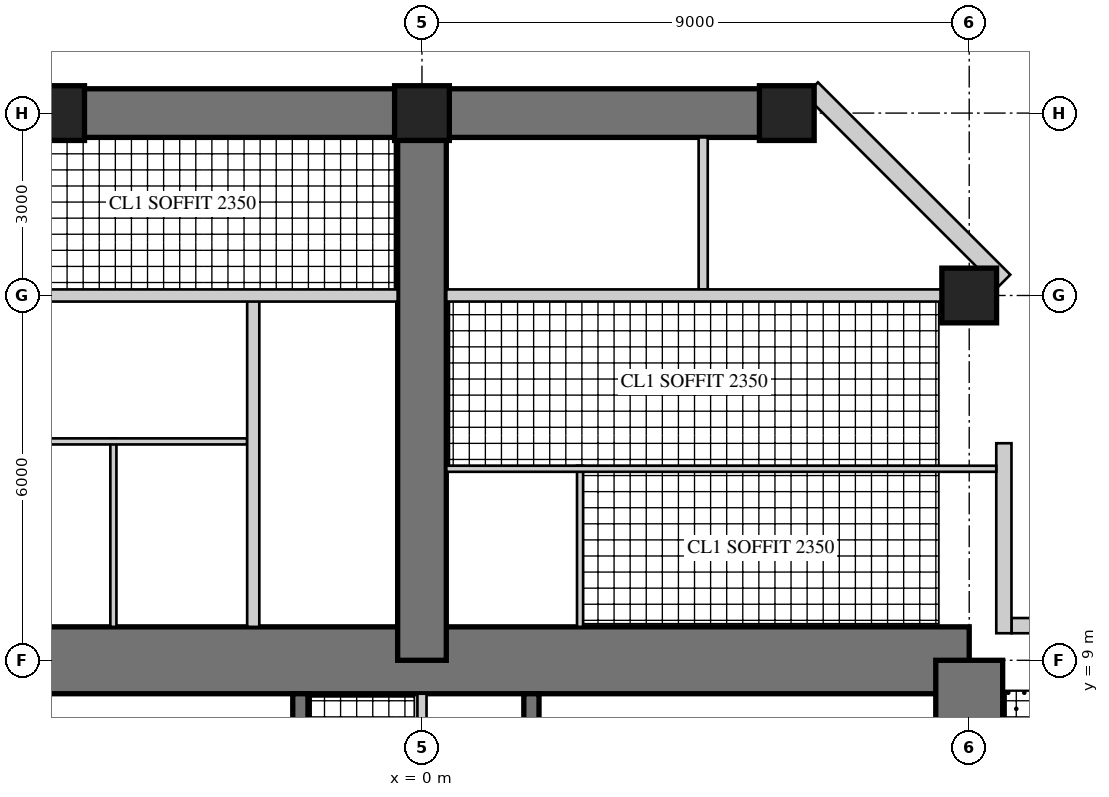
"""IFC4 building model, lengths in metres.
Left out: names, types, materials, properties, quantities, classifications, styles, units other than length and angle.
Written with IfcOpenShell. Run it as: python <this file> out.ifc"""

import sys

from ifc_helpers import new_model, si_unit, direction, frame, frame_2d, origin, origin_2d, place, context, subcontext, project, spatial, rectangle, hollow_rectangle, extrude, element, fill, save


model = new_model("IFC4")
c1 = context("Model", 3, precision=1e-05, world=origin(), true_north=direction((0.0, 1.0)))
c2 = subcontext(c1, "Body", "Model", "MODEL_VIEW")
j1 = project(units=[si_unit("LENGTHUNIT", "METRE"), si_unit("PLANEANGLEUNIT", "RADIAN")], contexts=[c1])
p1 = place(None, origin())
s1 = spatial("IfcSite", under=j1, at=p1, CompositionType="ELEMENT")
p2 = place(p1, origin())
s2 = spatial("IfcBuilding", under=s1, at=p2, CompositionType="ELEMENT")
p3 = place(p2, frame((0.0, 0.0, 206.9)))
s3 = spatial("IfcBuildingStorey", under=s2, at=p3, CompositionType="ELEMENT", Elevation=206.9)
p4 = place(p3, frame((9.0, 9.0, 0.0), z_axis=(0.0, 0.0, 1.0), x_axis=(-1.0, 0.0, 0.0)))
e1 = element("IfcWall", 1, at=p4, inside=s3, PredefinedType="SHEAR", context=c2, shape_type="SweptSolid", body=[
    extrude(rectangle(XDim=18.0, YDim=1.1, at=frame_2d((9.0, 0.0))), origin(), (0.0, 0.0, 1.0), 3.4),
])
p5 = place(p4, frame((9.8, 0.0, 0.0)))
e2 = element("IfcOpeningElement", 2, at=p5, cuts=e1, PredefinedType="OPENING", context=c2, shape_type="SweptSolid", body=[
    extrude(rectangle(XDim=1.0, YDim=2.4, at=frame_2d((0.5, 1.2))), frame((0.0, 0.56, 0.0), z_axis=(0.0, -1.0, 0.0), x_axis=(1.0, 0.0, 0.0)), (0.0, 0.0, 1.0), 1.12),
])
p6 = place(p3, frame((9.0, -9.0, 0.0), z_axis=(0.0, 0.0, 1.0), x_axis=(0.0, 1.0, 0.0)))
e3 = element("IfcWall", 3, at=p6, inside=s3, PredefinedType="SHEAR", context=c2, shape_type="SweptSolid", body=[
    extrude(rectangle(XDim=18.0, YDim=1.1, at=frame_2d((9.0, 0.0))), origin(), (0.0, 0.0, 1.0), 3.4),
])
p7 = place(p6, frame((9.8, 0.0, 0.0)))
e4 = element("IfcOpeningElement", 4, at=p7, cuts=e3, PredefinedType="OPENING", context=c2, shape_type="SweptSolid", body=[
    extrude(rectangle(XDim=1.0, YDim=2.4, at=frame_2d((0.5, 1.2))), frame((0.0, 0.56, 0.0), z_axis=(0.0, -1.0, 0.0), x_axis=(1.0, 0.0, 0.0)), (0.0, 0.0, 1.0), 1.12),
])
p8 = place(p3, frame((1.8, 1.875, 0.0), z_axis=(0.0, 0.0, 1.0), x_axis=(0.0, 1.0, 0.0)))
e5 = element("IfcWall", 5, at=p8, inside=s3, PredefinedType="SHEAR", context=c2, shape_type="SweptSolid", body=[
    extrude(rectangle(XDim=6.575, YDim=0.25, at=frame_2d((3.288, 0.0))), origin(), (0.0, 0.0, 1.0), 3.4),
])
p9 = place(p8, frame((1.875, 0.0, 0.0)))
e6 = element("IfcOpeningElement", 6, at=p9, cuts=e5, PredefinedType="OPENING", context=c2, shape_type="SweptSolid", body=[
    extrude(rectangle(XDim=1.6, YDim=2.4, at=frame_2d((0.8, 1.2))), frame((0.0, 0.135, 0.0), z_axis=(0.0, -1.0, 0.0), x_axis=(1.0, 0.0, 0.0)), (0.0, 0.0, 1.0), 0.27),
])
p10 = place(p3, frame((-2.0, 1.675, 0.0), z_axis=(0.0, 0.0, 1.0), x_axis=(0.0, 1.0, 0.0)))
e7 = element("IfcWall", 7, at=p10, inside=s3, PredefinedType="SHEAR", context=c2, shape_type="SweptSolid", body=[
    extrude(rectangle(XDim=6.775, YDim=0.25, at=frame_2d((3.387, 0.0))), origin(), (0.0, 0.0, 1.0), 3.4),
])
p11 = place(p10, frame((0.725, 0.0, 0.0)))
e8 = element("IfcOpeningElement", 8, at=p11, cuts=e7, PredefinedType="OPENING", context=c2, shape_type="SweptSolid", body=[
    extrude(rectangle(XDim=1.0, YDim=2.1, at=frame_2d((0.5, 1.05))), frame((0.0, 0.135, 0.0), z_axis=(0.0, -1.0, 0.0), x_axis=(1.0, 0.0, 0.0)), (0.0, 0.0, 1.0), 0.27),
])
p12 = place(p3, frame((0.0, 9.0, 0.0), z_axis=(0.0, 0.0, 1.0), x_axis=(0.0, 1.0, 0.0)))
e9 = element("IfcWall", 9, at=p12, inside=s3, PredefinedType="SHEAR", context=c2, shape_type="SweptSolid", body=[
    extrude(rectangle(XDim=9.0, YDim=0.8, at=frame_2d((4.5, 0.0))), origin(), (0.0, 0.0, 1.0), 3.4),
])
p13 = place(p12, frame((3.95, 0.0, 0.0)))
e10 = element("IfcOpeningElement", 10, at=p13, cuts=e9, PredefinedType="OPENING", context=c2, shape_type="SweptSolid", body=[
    extrude(rectangle(XDim=1.0, YDim=2.15, at=frame_2d((0.5, 1.075))), frame((0.0, 0.41, 0.0), z_axis=(0.0, -1.0, 0.0), x_axis=(1.0, 0.0, 0.0)), (0.0, 0.0, 1.0), 0.82),
])
p14 = place(p12, frame((7.0, 0.0, 0.0)))
e11 = element("IfcOpeningElement", 11, at=p14, cuts=e9, PredefinedType="OPENING", context=c2, shape_type="SweptSolid", body=[
    extrude(rectangle(XDim=1.0, YDim=2.2, at=frame_2d((0.5, 1.1))), frame((0.0, 0.41, 0.0), z_axis=(0.0, -1.0, 0.0), x_axis=(1.0, 0.0, 0.0)), (0.0, 0.0, 1.0), 0.82),
])
p15 = place(p3, frame((6.0, 18.0, 0.0), z_axis=(0.0, 0.0, 1.0), x_axis=(-1.0, 0.0, 0.0)))
e12 = element("IfcWall", 12, at=p15, inside=s3, PredefinedType="SHEAR", context=c2, shape_type="SweptSolid", body=[
    extrude(rectangle(XDim=12.0, YDim=0.8, at=frame_2d((6.0, 0.0))), origin(), (0.0, 0.0, 1.0), 3.4),
])
p16 = place(p15, frame((1.625, 0.0, 0.6)))
e13 = element("IfcOpeningElement", 13, at=p16, cuts=e12, PredefinedType="OPENING", context=c2, shape_type="SweptSolid", body=[
    extrude(rectangle(XDim=3.0, YDim=2.4, at=frame_2d((1.5, 1.2))), frame((0.0, 0.41, 0.0), z_axis=(0.0, -1.0, 0.0), x_axis=(1.0, 0.0, 0.0)), (0.0, 0.0, 1.0), 0.82),
])
p17 = place(p15, frame((7.375, 0.0, 0.6)))
e14 = element("IfcOpeningElement", 14, at=p17, cuts=e12, PredefinedType="OPENING", context=c2, shape_type="SweptSolid", body=[
    extrude(rectangle(XDim=3.0, YDim=2.4, at=frame_2d((1.5, 1.2))), frame((0.0, 0.41, 0.0), z_axis=(0.0, -1.0, 0.0), x_axis=(1.0, 0.0, 0.0)), (0.0, 0.0, 1.0), 0.82),
])
for number, where, z_axis, x_axis in (
    (15, (9.0, 15.0, 0.0), (0.0, 0.0, 1.0), (1.0, 0.0, 0.0)),
    (16, (6.0, 18.0, 0.0), (0.0, 0.0, 1.0), (1.0, 0.0, 0.0)),
    (17, (0.0, 18.0, 0.0), (0.0, 0.0, 1.0), (1.0, 0.0, 0.0)),
    (18, (-6.0, 18.0, 0.0), (0.0, 0.0, 1.0), (1.0, 0.0, 0.0)),
):
    element("IfcColumn", number, at=place(p3, frame(where, z_axis=z_axis, x_axis=x_axis)), inside=s3, PredefinedType="COLUMN", context=c2, shape_type="SweptSolid", body=[
        extrude(rectangle(XDim=0.9, YDim=0.9, at=origin_2d()), origin(), (0.0, 0.0, 1.0), 3.4),
    ])
p18 = place(p3, frame((12.57, 9.57, 0.0), z_axis=(0.0, 0.0, 1.0), x_axis=(-1.0, 0.0, 0.0)))
e19 = element("IfcWall", 19, at=p18, inside=s3, PredefinedType="SOLIDWALL", context=c2, shape_type="SweptSolid", body=[
    extrude(rectangle(XDim=2.875, YDim=0.25, at=frame_2d((1.438, 0.0))), origin(), (0.0, 0.0, 1.0), 3.22),
])
p19 = place(p18, frame((0.6, 0.0, 0.0)))
e20 = element("IfcOpeningElement", 20, at=p19, cuts=e19, PredefinedType="OPENING", context=c2, shape_type="SweptSolid", body=[
    extrude(rectangle(XDim=1.0, YDim=2.2, at=frame_2d((0.5, 1.1))), frame((0.0, 0.135, 0.0), z_axis=(0.0, -1.0, 0.0), x_axis=(1.0, 0.0, 0.0)), (0.0, 0.0, 1.0), 0.27),
])
p20 = place(p3, frame((9.57, 9.445, 0.0), z_axis=(0.0, 0.0, 1.0), x_axis=(0.0, 1.0, 0.0)))
e21 = element("IfcWall", 21, at=p20, inside=s3, PredefinedType="SOLIDWALL", context=c2, shape_type="SweptSolid", body=[
    extrude(rectangle(XDim=3.125, YDim=0.25, at=frame_2d((1.562, 0.0))), origin(), (0.0, 0.0, 1.0), 3.22),
])
p21 = place(p20, frame((0.6, 0.0, 0.0)))
e22 = element("IfcOpeningElement", 22, at=p21, cuts=e21, PredefinedType="OPENING", context=c2, shape_type="SweptSolid", body=[
    extrude(rectangle(XDim=1.0, YDim=2.2, at=frame_2d((0.5, 1.1))), frame((0.0, 0.135, 0.0), z_axis=(0.0, -1.0, 0.0), x_axis=(1.0, 0.0, 0.0)), (0.0, 0.0, 1.0), 0.27),
])
p22 = place(p3, frame((9.57, 15.236, 0.0), z_axis=(0.0, 0.0, 1.0), x_axis=(-0.707134062067, 0.707079499254, 0.0)))
e23 = element("IfcWall", 23, at=p22, inside=s3, PredefinedType="SOLIDWALL", context=c2, shape_type="SweptSolid", body=[
    extrude(rectangle(XDim=4.475, YDim=0.3, at=frame_2d((2.237, 0.0))), origin(), (0.0, 0.0, 1.0), 3.22),
])
p23 = place(p22, frame((1.787, 0.0, 0.3)))
e24 = element("IfcOpeningElement", 24, at=p23, cuts=e23, PredefinedType="OPENING", context=c2, shape_type="SweptSolid", body=[
    extrude(rectangle(XDim=0.9, YDim=2.4, at=frame_2d((0.45, 1.2))), frame((0.0, 0.16, 0.0), z_axis=(0.0, -1.0, 0.0), x_axis=(1.0, 0.0, 0.0)), (0.0, 0.0, 1.0), 0.32),
])
p24 = place(p3, frame((0.0, 5.675, 0.0), z_axis=(0.0, 0.0, 1.0), x_axis=(0.0, 1.0, 0.0)))
e25 = element("IfcWall", 25, at=p24, inside=s3, PredefinedType="PARTITIONING", context=c2, shape_type="SweptSolid", body=[
    extrude(rectangle(XDim=2.775, YDim=0.15, at=frame_2d((1.387, 0.0))), origin(), (0.0, 0.0, 1.0), 3.22),
])
p25 = place(p24, frame((0.4, 0.0, 0.0)))
e26 = element("IfcOpeningElement", 26, at=p25, cuts=e25, PredefinedType="OPENING", context=c2, shape_type="SweptSolid", body=[
    extrude(rectangle(XDim=1.0, YDim=2.1, at=frame_2d((0.5, 1.05))), frame((0.0, 0.085, 0.0), z_axis=(0.0, -1.0, 0.0), x_axis=(1.0, 0.0, 0.0)), (0.0, 0.0, 1.0), 0.17),
])
p26 = place(p3, frame((-5.075, 9.55, 0.0), z_axis=(0.0, 0.0, 1.0), x_axis=(0.0, 1.0, 0.0)))
e27 = element("IfcWall", 27, at=p26, inside=s3, PredefinedType="PARTITIONING", context=c2, shape_type="SweptSolid", body=[
    extrude(rectangle(XDim=3.1, YDim=0.1, at=frame_2d((1.55, 0.0))), origin(), (0.0, 0.0, 1.0), 3.22),
])
p27 = place(p3, frame((-2.875, 12.6, 0.0), z_axis=(0.0, 0.0, 1.0), x_axis=(-1.0, 0.0, 0.0)))
e28 = element("IfcWall", 28, at=p27, inside=s3, PredefinedType="PARTITIONING", context=c2, shape_type="SweptSolid", body=[
    extrude(rectangle(XDim=6.57, YDim=0.1, at=frame_2d((3.285, 0.0))), origin(), (0.0, 0.0, 1.0), 3.22),
])
p28 = place(p27, frame((0.55, 0.0, 0.0)))
e29 = element("IfcOpeningElement", 29, at=p28, cuts=e28, PredefinedType="OPENING", context=c2, shape_type="SweptSolid", body=[
    extrude(rectangle(XDim=0.9, YDim=2.1, at=frame_2d((0.45, 1.05))), frame((0.0, 0.06, 0.0), z_axis=(0.0, -1.0, 0.0), x_axis=(1.0, 0.0, 0.0)), (0.0, 0.0, 1.0), 0.12),
])
p29 = place(p27, frame((2.65, 0.0, 0.0)))
e30 = element("IfcOpeningElement", 30, at=p29, cuts=e28, PredefinedType="OPENING", context=c2, shape_type="SweptSolid", body=[
    extrude(rectangle(XDim=0.9, YDim=2.1, at=frame_2d((0.45, 1.05))), frame((0.0, 0.06, 0.0), z_axis=(0.0, -1.0, 0.0), x_axis=(1.0, 0.0, 0.0)), (0.0, 0.0, 1.0), 0.12),
])
p30 = place(p3, frame((2.6, 9.55, 0.0), z_axis=(0.0, 0.0, 1.0), x_axis=(0.0, 1.0, 0.0)))
e31 = element("IfcWall", 31, at=p30, inside=s3, PredefinedType="PARTITIONING", context=c2, shape_type="SweptSolid", body=[
    extrude(rectangle(XDim=2.65, YDim=0.1, at=frame_2d((1.325, 0.0))), origin(), (0.0, 0.0, 1.0), 3.22),
])
p31 = place(p3, frame((9.445, 12.15, 0.0), z_axis=(0.0, 0.0, 1.0), x_axis=(-1.0, 0.0, 0.0)))
e32 = element("IfcWall", 32, at=p31, inside=s3, PredefinedType="PARTITIONING", context=c2, shape_type="SweptSolid", body=[
    extrude(rectangle(XDim=9.045, YDim=0.1, at=frame_2d((4.522, 0.0))), origin(), (0.0, 0.0, 1.0), 3.22),
])
p32 = place(p31, frame((5.495, 0.0, 0.0)))
e33 = element("IfcOpeningElement", 33, at=p32, cuts=e32, PredefinedType="OPENING", context=c2, shape_type="SweptSolid", body=[
    extrude(rectangle(XDim=0.9, YDim=2.1, at=frame_2d((0.45, 1.05))), frame((0.0, 0.06, 0.0), z_axis=(0.0, -1.0, 0.0), x_axis=(1.0, 0.0, 0.0)), (0.0, 0.0, 1.0), 0.12),
])
p33 = place(p31, frame((7.595, 0.0, 0.0)))
e34 = element("IfcOpeningElement", 34, at=p33, cuts=e32, PredefinedType="OPENING", context=c2, shape_type="SweptSolid", body=[
    extrude(rectangle(XDim=0.9, YDim=2.1, at=frame_2d((0.45, 1.05))), frame((0.0, 0.06, 0.0), z_axis=(0.0, -1.0, 0.0), x_axis=(1.0, 0.0, 0.0)), (0.0, 0.0, 1.0), 0.12),
])
p34 = place(p3, frame((-2.775, 9.55, 0.0), z_axis=(0.0, 0.0, 1.0), x_axis=(0.0, 1.0, 0.0)))
e35 = element("IfcWall", 35, at=p34, inside=s3, PredefinedType="SOLIDWALL", context=c2, shape_type="SweptSolid", body=[
    extrude(rectangle(XDim=5.45, YDim=0.2, at=frame_2d((2.725, 0.0))), origin(), (0.0, 0.0, 1.0), 3.22),
])
p35 = place(p34, frame((3.6, 0.0, 0.0)))
e36 = element("IfcOpeningElement", 36, at=p35, cuts=e35, PredefinedType="OPENING", context=c2, shape_type="SweptSolid", body=[
    extrude(rectangle(XDim=1.0, YDim=2.15, at=frame_2d((0.5, 1.075))), frame((0.0, 0.11, 0.0), z_axis=(0.0, -1.0, 0.0), x_axis=(1.0, 0.0, 0.0)), (0.0, 0.0, 1.0), 0.22),
])
p36 = place(p3, frame((4.625, 15.1, 0.0), z_axis=(0.0, 0.0, 1.0), x_axis=(0.0, 1.0, 0.0)))
e37 = element("IfcWall", 37, at=p36, inside=s3, PredefinedType="PARTITIONING", context=c2, shape_type="SweptSolid", body=[
    extrude(rectangle(XDim=2.5, YDim=0.15, at=frame_2d((1.25, 0.0))), origin(), (0.0, 0.0, 1.0), 3.22),
])
p37 = place(p36, frame((0.6, 0.0, 0.0)))
e38 = element("IfcOpeningElement", 38, at=p37, cuts=e37, PredefinedType="OPENING", context=c2, shape_type="SweptSolid", body=[
    extrude(rectangle(XDim=1.0, YDim=2.1, at=frame_2d((0.5, 1.05))), frame((0.0, 0.085, 0.0), z_axis=(0.0, -1.0, 0.0), x_axis=(1.0, 0.0, 0.0)), (0.0, 0.0, 1.0), 0.17),
])
p38 = place(p3, frame((8.55, 15.0, 0.0), z_axis=(0.0, 0.0, 1.0), x_axis=(-1.0, 0.0, 0.0)))
e39 = element("IfcWall", 39, at=p38, inside=s3, PredefinedType="SOLIDWALL", context=c2, shape_type="SweptSolid", body=[
    extrude(rectangle(XDim=8.15, YDim=0.2, at=frame_2d((4.075, 0.0))), origin(), (0.0, 0.0, 1.0), 2.47),
])
p39 = place(p3, frame((-0.4, 15.0, 0.0), z_axis=(0.0, 0.0, 1.0), x_axis=(-1.0, 0.0, 0.0)))
e40 = element("IfcWall", 40, at=p39, inside=s3, PredefinedType="SOLIDWALL", context=c2, shape_type="SweptSolid", body=[
    extrude(rectangle(XDim=8.15, YDim=0.2, at=frame_2d((4.075, 0.0))), origin(), (0.0, 0.0, 1.0), 2.47),
])
p40 = place(p39, frame((0.4, 0.0, 0.0)))
e41 = element("IfcOpeningElement", 41, at=p40, cuts=e40, PredefinedType="OPENING", context=c2, shape_type="SweptSolid", body=[
    extrude(rectangle(XDim=1.0, YDim=2.2, at=frame_2d((0.5, 1.1))), frame((0.0, 0.11, 0.0), z_axis=(0.0, -1.0, 0.0), x_axis=(1.0, 0.0, 0.0)), (0.0, 0.0, 1.0), 0.22),
])
p41 = place(p21, origin())
e42 = element("IfcDoor", 42, at=p41, inside=s3, OperationType="SINGLE_SWING_LEFT", PredefinedType="DOOR", context=c2, shape_type="SweptSolid", body=[
    extrude(hollow_rectangle(XDim=1.0, YDim=2.2, WallThickness=0.06, at=frame_2d((0.5, 1.1))), frame((0.0, 0.025, 0.0), z_axis=(0.0, -1.0, 0.0), x_axis=(1.0, 0.0, 0.0)), (0.0, 0.0, 1.0), 0.05),
    extrude(rectangle(XDim=0.879, YDim=2.079, at=frame_2d((0.5, 1.1))), frame((0.0, 0.025, 0.0), z_axis=(0.0, -1.0, 0.0), x_axis=(1.0, 0.0, 0.0)), (0.0, 0.0, 1.0), 0.05),
])
fill(e22, e42)
p42 = place(p23, origin())
e43 = element("IfcWindow", 43, at=p42, inside=s3, PartitioningType="SINGLE_PANEL", PredefinedType="WINDOW", context=c2, shape_type="SweptSolid", body=[
    extrude(hollow_rectangle(XDim=0.9, YDim=2.4, WallThickness=0.06, at=frame_2d((0.45, 1.2))), frame((0.0, 0.03, 0.0), z_axis=(0.0, -1.0, 0.0), x_axis=(1.0, 0.0, 0.0)), (0.0, 0.0, 1.0), 0.06),
    extrude(rectangle(XDim=0.779, YDim=2.279, at=frame_2d((0.45, 1.2))), frame((0.0, 0.03, 0.0), z_axis=(0.0, -1.0, 0.0), x_axis=(1.0, 0.0, 0.0)), (0.0, 0.0, 1.0), 0.06),
])
fill(e24, e43)
p43 = place(p16, origin())
e44 = element("IfcWindow", 44, at=p43, inside=s3, PartitioningType="SINGLE_PANEL", PredefinedType="WINDOW", context=c2, shape_type="SweptSolid", body=[
    extrude(hollow_rectangle(XDim=3.0, YDim=2.4, WallThickness=0.06, at=frame_2d((1.5, 1.2))), frame((0.0, 0.03, 0.0), z_axis=(0.0, -1.0, 0.0), x_axis=(1.0, 0.0, 0.0)), (0.0, 0.0, 1.0), 0.06),
    extrude(rectangle(XDim=2.879, YDim=2.279, at=frame_2d((1.5, 1.2))), frame((0.0, 0.03, 0.0), z_axis=(0.0, -1.0, 0.0), x_axis=(1.0, 0.0, 0.0)), (0.0, 0.0, 1.0), 0.06),
])
fill(e13, e44)
p44 = place(p17, origin())
e45 = element("IfcWindow", 45, at=p44, inside=s3, PartitioningType="SINGLE_PANEL", PredefinedType="WINDOW", context=c2, shape_type="SweptSolid", body=[
    extrude(hollow_rectangle(XDim=3.0, YDim=2.4, WallThickness=0.06, at=frame_2d((1.5, 1.2))), frame((0.0, 0.03, 0.0), z_axis=(0.0, -1.0, 0.0), x_axis=(1.0, 0.0, 0.0)), (0.0, 0.0, 1.0), 0.06),
    extrude(rectangle(XDim=2.879, YDim=2.279, at=frame_2d((1.5, 1.2))), frame((0.0, 0.03, 0.0), z_axis=(0.0, -1.0, 0.0), x_axis=(1.0, 0.0, 0.0)), (0.0, 0.0, 1.0), 0.06),
])
fill(e14, e45)
p45 = place(p28, origin())
e46 = element("IfcDoor", 46, at=p45, inside=s3, OperationType="SINGLE_SWING_LEFT", PredefinedType="DOOR", context=c2, shape_type="SweptSolid", body=[
    extrude(rectangle(XDim=0.9, YDim=2.1, at=frame_2d((0.45, 1.05))), frame((0.0, 0.025, 0.0), z_axis=(0.0, -1.0, 0.0), x_axis=(1.0, 0.0, 0.0)), (0.0, 0.0, 1.0), 0.05),
])
fill(e29, e46)
p46 = place(p29, origin())
e47 = element("IfcDoor", 47, at=p46, inside=s3, OperationType="SINGLE_SWING_LEFT", PredefinedType="DOOR", context=c2, shape_type="SweptSolid", body=[
    extrude(rectangle(XDim=0.9, YDim=2.1, at=frame_2d((0.45, 1.05))), frame((0.0, 0.025, 0.0), z_axis=(0.0, -1.0, 0.0), x_axis=(1.0, 0.0, 0.0)), (0.0, 0.0, 1.0), 0.05),
])
fill(e30, e47)
p47 = place(p32, origin())
e48 = element("IfcDoor", 48, at=p47, inside=s3, OperationType="SINGLE_SWING_RIGHT", PredefinedType="DOOR", context=c2, shape_type="SweptSolid", body=[
    extrude(rectangle(XDim=0.9, YDim=2.1, at=frame_2d((0.45, 1.05))), frame((0.0, 0.025, 0.0), z_axis=(0.0, -1.0, 0.0), x_axis=(1.0, 0.0, 0.0)), (0.0, 0.0, 1.0), 0.05),
])
fill(e33, e48)
p48 = place(p33, origin())
e49 = element("IfcDoor", 49, at=p48, inside=s3, OperationType="SINGLE_SWING_RIGHT", PredefinedType="DOOR", context=c2, shape_type="SweptSolid", body=[
    extrude(rectangle(XDim=0.9, YDim=2.1, at=frame_2d((0.45, 1.05))), frame((0.0, 0.025, 0.0), z_axis=(0.0, -1.0, 0.0), x_axis=(1.0, 0.0, 0.0)), (0.0, 0.0, 1.0), 0.05),
])
fill(e34, e49)
p49 = place(p35, origin())
e50 = element("IfcDoor", 50, at=p49, inside=s3, OperationType="SINGLE_SWING_LEFT", PredefinedType="DOOR", context=c2, shape_type="SweptSolid", body=[
    extrude(rectangle(XDim=1.0, YDim=2.15, at=frame_2d((0.5, 1.075))), frame((0.0, 0.025, 0.0), z_axis=(0.0, -1.0, 0.0), x_axis=(1.0, 0.0, 0.0)), (0.0, 0.0, 1.0), 0.05),
])
fill(e36, e50)
p50 = place(p37, frame((1.0, 0.0, 0.0), z_axis=(0.0, 0.0, 1.0), x_axis=(-1.0, 0.0, 0.0)))
e51 = element("IfcDoor", 51, at=p50, inside=s3, OperationType="SINGLE_SWING_RIGHT", PredefinedType="DOOR", context=c2, shape_type="SweptSolid", body=[
    extrude(rectangle(XDim=1.0, YDim=2.1, at=frame_2d((0.5, 1.05))), frame((0.0, 0.025, 0.0), z_axis=(0.0, -1.0, 0.0), x_axis=(1.0, 0.0, 0.0)), (0.0, 0.0, 1.0), 0.05),
])
fill(e38, e51)
p51 = place(p40, frame((1.0, 0.0, 0.0), z_axis=(0.0, 0.0, 1.0), x_axis=(-1.0, 0.0, 0.0)))
e52 = element("IfcDoor", 52, at=p51, inside=s3, OperationType="SINGLE_SWING_RIGHT", PredefinedType="DOOR", context=c2, shape_type="SweptSolid", body=[
    extrude(rectangle(XDim=1.0, YDim=2.2, at=frame_2d((0.5, 1.1))), frame((0.0, 0.025, 0.0), z_axis=(0.0, -1.0, 0.0), x_axis=(1.0, 0.0, 0.0)), (0.0, 0.0, 1.0), 0.05),
])
fill(e41, e52)
p52 = place(p13, frame((1.0, 0.0, 0.0), z_axis=(0.0, 0.0, 1.0), x_axis=(-1.0, 0.0, 0.0)))
e53 = element("IfcDoor", 53, at=p52, inside=s3, OperationType="SINGLE_SWING_RIGHT", PredefinedType="DOOR", context=c2, shape_type="SweptSolid", body=[
    extrude(rectangle(XDim=1.0, YDim=2.15, at=frame_2d((0.5, 1.075))), frame((0.0, 0.025, 0.0), z_axis=(0.0, -1.0, 0.0), x_axis=(1.0, 0.0, 0.0)), (0.0, 0.0, 1.0), 0.05),
])
fill(e10, e53)
p53 = place(p14, frame((1.0, 0.0, 0.0), z_axis=(0.0, 0.0, 1.0), x_axis=(-1.0, 0.0, 0.0)))
e54 = element("IfcDoor", 54, at=p53, inside=s3, OperationType="SINGLE_SWING_LEFT", PredefinedType="DOOR", context=c2, shape_type="SweptSolid", body=[
    extrude(rectangle(XDim=1.0, YDim=2.2, at=frame_2d((0.5, 1.1))), frame((0.0, 0.025, 0.0), z_axis=(0.0, -1.0, 0.0), x_axis=(1.0, 0.0, 0.0)), (0.0, 0.0, 1.0), 0.05),
])
fill(e11, e54)
p54 = place(p5, origin())
e55 = element("IfcDoor", 55, at=p54, inside=s3, OperationType="SINGLE_SWING_RIGHT", PredefinedType="DOOR", context=c2, shape_type="SweptSolid", body=[
    extrude(rectangle(XDim=1.0, YDim=2.4, at=frame_2d((0.5, 1.2))), frame((0.0, 0.055, 0.0), z_axis=(0.0, -1.0, 0.0), x_axis=(1.0, 0.0, 0.0)), (0.0, 0.0, 1.0), 0.05),
])
fill(e2, e55)
save(model, sys.argv[1])
